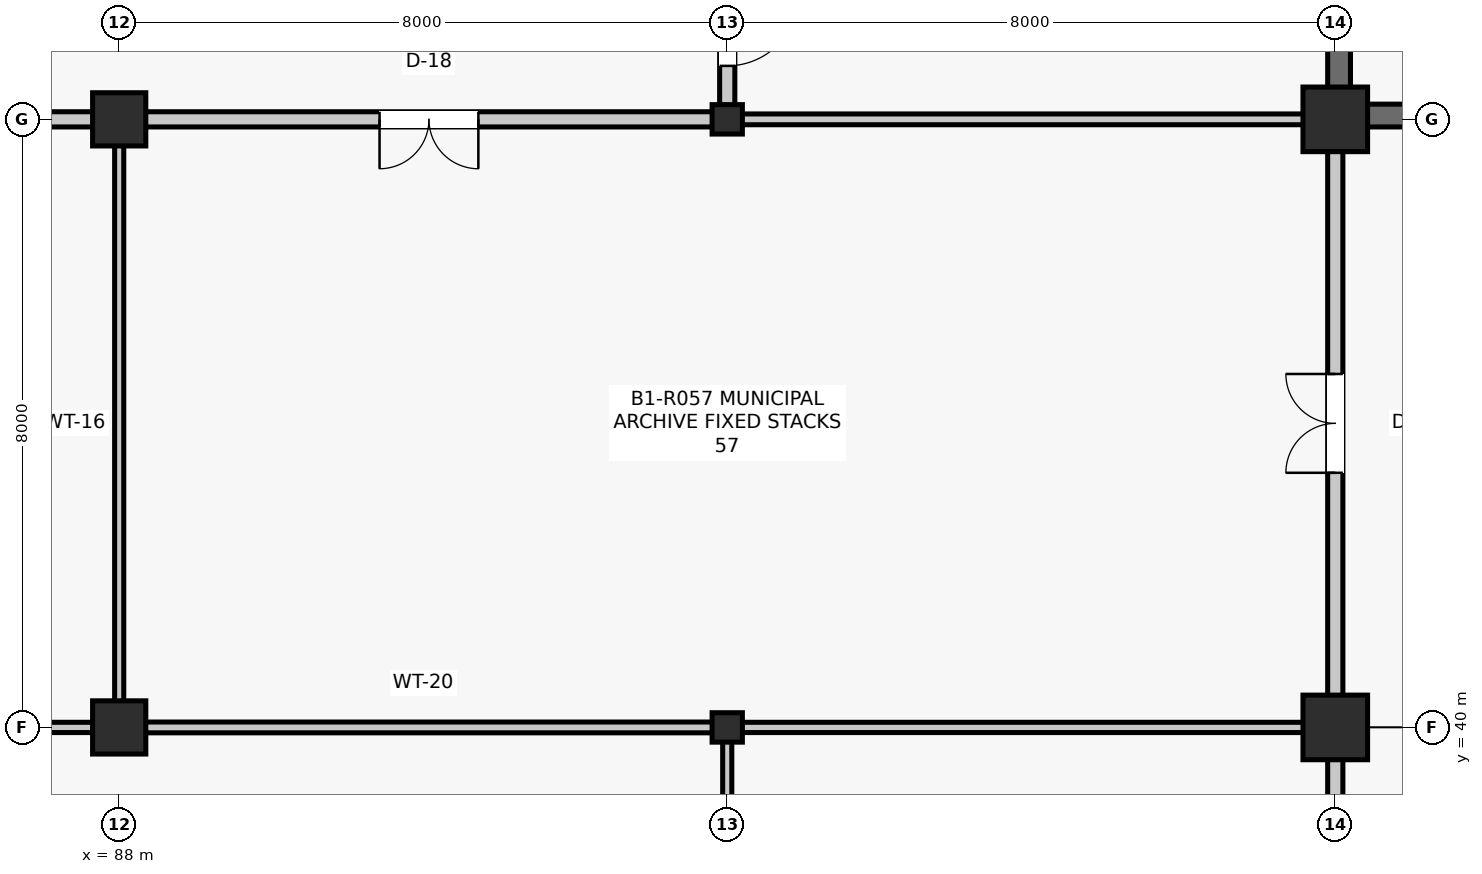
"""IFC4 building model, lengths in metres.
Left out: names, types, materials, properties, quantities, classifications, styles, units other than length and angle.
Written with IfcOpenShell. Run it as: python <this file> out.ifc"""

import sys

from ifc_helpers import new_model, si_unit, direction, frame, frame_2d, origin, origin_2d, place, context, subcontext, project, spatial, rectangle, i_section, extrude, element, fill, save


model = new_model("IFC4")
c1 = context("Model", 3, precision=1e-05, world=origin(), true_north=direction((0.0, 1.0)))
c2 = subcontext(c1, "Body", "Model", "MODEL_VIEW")
j1 = project(units=[si_unit("LENGTHUNIT", "METRE"), si_unit("PLANEANGLEUNIT", "RADIAN")], contexts=[c1])
p1 = place(None, origin())
s1 = spatial("IfcSite", under=j1, at=p1, CompositionType="ELEMENT")
p2 = place(p1, origin())
s2 = spatial("IfcBuilding", under=s1, at=p2, CompositionType="ELEMENT")
p3 = place(p2, frame((0.0, 0.0, -4.29)))
s3 = spatial("IfcBuildingStorey", under=s2, at=p3, CompositionType="ELEMENT", Elevation=-4.29)
for number, where, z_axis, x_axis in (
    (1, (88.0, 40.0, 0.0), (0.0, 0.0, 1.0), (1.0, 0.0, 0.0)),
    (2, (88.0, 48.0, 0.0), (0.0, 0.0, 1.0), (1.0, 0.0, 0.0)),
):
    element("IfcColumn", number, at=place(p3, frame(where, z_axis=z_axis, x_axis=x_axis)), inside=s3, PredefinedType="COLUMN", context=c2, shape_type="SweptSolid", body=[
        extrude(rectangle(XDim=0.7, YDim=0.7, at=origin_2d()), origin(), (0.0, 0.0, 1.0), 4.29),
    ])
for number, where, z_axis, x_axis in (
    (3, (96.0, 40.0, 0.0), (0.0, 0.0, 1.0), (1.0, 0.0, 0.0)),
    (4, (96.0, 48.0, 0.0), (0.0, 0.0, 1.0), (1.0, 0.0, 0.0)),
):
    element("IfcColumn", number, at=place(p3, frame(where, z_axis=z_axis, x_axis=x_axis)), inside=s3, PredefinedType="COLUMN", context=c2, shape_type="SweptSolid", body=[
        extrude(i_section(OverallWidth=0.398, OverallDepth=0.387, WebThickness=0.021, FlangeThickness=0.033, FilletRadius=0.015, at=origin_2d()), origin(), (0.0, 0.0, 1.0), 4.29),
    ])
for number, where, z_axis, x_axis in (
    (5, (104.0, 40.0, 0.0), (0.0, 0.0, 1.0), (1.0, 0.0, 0.0)),
    (6, (104.0, 48.0, 0.0), (0.0, 0.0, 1.0), (1.0, 0.0, 0.0)),
):
    element("IfcColumn", number, at=place(p3, frame(where, z_axis=z_axis, x_axis=x_axis)), inside=s3, PredefinedType="COLUMN", context=c2, shape_type="SweptSolid", body=[
        extrude(rectangle(XDim=0.85, YDim=0.85, at=origin_2d()), origin(), (0.0, 0.0, 1.0), 4.29),
    ])
p4 = place(p3, frame((104.05, 48.315, 0.0), z_axis=(0.0, 0.0, 1.0), x_axis=(0.0, 1.0, 0.0)))
e7 = element("IfcWall", 7, at=p4, inside=s3, PredefinedType="SHEAR", context=c2, shape_type="SweptSolid", body=[
    extrude(rectangle(XDim=7.37, YDim=0.3, at=frame_2d((3.685, 0.0))), origin(), (0.0, 0.0, 1.0), 4.015),
])
p5 = place(p3, frame((104.315, 48.05, 0.0), z_axis=(0.0, 0.0, 1.0), x_axis=(1.0, 0.0, 0.0)))
e8 = element("IfcWall", 8, at=p5, inside=s3, PredefinedType="SHEAR", context=c2, shape_type="SweptSolid", body=[
    extrude(rectangle(XDim=3.835, YDim=0.3, at=frame_2d((1.917, 0.0))), origin(), (0.0, 0.0, 1.0), 4.015),
])
p6 = place(p3, frame((80.189, 40.0, 0.0), z_axis=(0.0, 0.0, 1.0), x_axis=(1.0, 0.0, 0.0)))
e9 = element("IfcWall", 9, at=p6, inside=s3, PredefinedType="PARTITIONING", context=c2, shape_type="SweptSolid", body=[
    extrude(rectangle(XDim=7.471, YDim=0.135, at=frame_2d((3.735, 0.0))), origin(), (0.0, 0.0, 1.0), 3.394),
])
p7 = place(p3, frame((88.0, 40.34, 0.0), z_axis=(0.0, 0.0, 1.0), x_axis=(0.0, 1.0, 0.0)))
e10 = element("IfcWall", 10, at=p7, inside=s3, PredefinedType="PARTITIONING", context=c2, shape_type="SweptSolid", body=[
    extrude(rectangle(XDim=7.32, YDim=0.12, at=frame_2d((3.66, 0.0))), origin(), (0.0, 0.0, 1.0), 3.393),
])
p8 = place(p3, frame((80.189, 48.0, 0.0), z_axis=(0.0, 0.0, 1.0), x_axis=(1.0, 0.0, 0.0)))
e11 = element("IfcWall", 11, at=p8, inside=s3, PredefinedType="PARTITIONING", context=c2, shape_type="SweptSolid", body=[
    extrude(rectangle(XDim=7.471, YDim=0.2, at=frame_2d((3.735, 0.0))), origin(), (0.0, 0.0, 1.0), 3.317),
])
p9 = place(p8, frame((1.368, 0.0, 0.0)))
e12 = element("IfcOpeningElement", 12, at=p9, cuts=e11, PredefinedType="OPENING", context=c2, shape_type="SweptSolid", body=[
    extrude(rectangle(XDim=1.0, YDim=2.15, at=frame_2d((0.5, 1.075))), frame((0.0, 0.11, 0.0), z_axis=(0.0, -1.0, 0.0), x_axis=(1.0, 0.0, 0.0)), (0.0, 0.0, 1.0), 0.22),
])
p10 = place(p8, frame((5.477, 0.0, 0.0)))
e13 = element("IfcOpeningElement", 13, at=p10, cuts=e11, PredefinedType="OPENING", context=c2, shape_type="SweptSolid", body=[
    extrude(rectangle(XDim=1.0, YDim=2.15, at=frame_2d((0.5, 1.075))), frame((0.0, 0.11, 0.0), z_axis=(0.0, -1.0, 0.0), x_axis=(1.0, 0.0, 0.0)), (0.0, 0.0, 1.0), 0.22),
])
p11 = place(p3, frame((96.0, 32.184, 0.0), z_axis=(0.0, 0.0, 1.0), x_axis=(0.0, 1.0, 0.0)))
e14 = element("IfcWall", 14, at=p11, inside=s3, PredefinedType="PARTITIONING", context=c2, shape_type="SweptSolid", body=[
    extrude(rectangle(XDim=7.633, YDim=0.12, at=frame_2d((3.816, 0.0))), origin(), (0.0, 0.0, 1.0), 3.393),
])
p12 = place(p3, frame((88.34, 40.0, 0.0), z_axis=(0.0, 0.0, 1.0), x_axis=(1.0, 0.0, 0.0)))
e15 = element("IfcWall", 15, at=p12, inside=s3, PredefinedType="PARTITIONING", context=c2, shape_type="SweptSolid", body=[
    extrude(rectangle(XDim=7.471, YDim=0.142, at=frame_2d((3.735, 0.0))), origin(), (0.0, 0.0, 1.0), 3.317),
])
p13 = place(p3, frame((88.34, 48.0, 0.0), z_axis=(0.0, 0.0, 1.0), x_axis=(1.0, 0.0, 0.0)))
e16 = element("IfcWall", 16, at=p13, inside=s3, PredefinedType="PARTITIONING", context=c2, shape_type="SweptSolid", body=[
    extrude(rectangle(XDim=7.471, YDim=0.2, at=frame_2d((3.735, 0.0))), origin(), (0.0, 0.0, 1.0), 3.393),
])
p14 = place(p13, frame((3.085, 0.0, 0.0)))
e17 = element("IfcOpeningElement", 17, at=p14, cuts=e16, PredefinedType="OPENING", context=c2, shape_type="SweptSolid", body=[
    extrude(rectangle(XDim=1.3, YDim=2.2, at=frame_2d((0.65, 1.1))), frame((0.0, 0.11, 0.0), z_axis=(0.0, -1.0, 0.0), x_axis=(1.0, 0.0, 0.0)), (0.0, 0.0, 1.0), 0.22),
])
p15 = place(p3, frame((96.0, 48.184, 0.0), z_axis=(0.0, 0.0, 1.0), x_axis=(0.0, 1.0, 0.0)))
e18 = element("IfcWall", 18, at=p15, inside=s3, PredefinedType="PARTITIONING", context=c2, shape_type="SweptSolid", body=[
    extrude(rectangle(XDim=7.633, YDim=0.2, at=frame_2d((3.816, 0.0))), origin(), (0.0, 0.0, 1.0), 3.394),
])
p16 = place(p15, frame((0.52, 0.0, 0.0)))
e19 = element("IfcOpeningElement", 19, at=p16, cuts=e18, PredefinedType="OPENING", context=c2, shape_type="SweptSolid", body=[
    extrude(rectangle(XDim=0.94, YDim=2.12, at=frame_2d((0.47, 1.06))), frame((0.0, 0.11, 0.0), z_axis=(0.0, -1.0, 0.0), x_axis=(1.0, 0.0, 0.0)), (0.0, 0.0, 1.0), 0.22),
])
p17 = place(p3, frame((104.0, 32.415, 0.0), z_axis=(0.0, 0.0, 1.0), x_axis=(0.0, 1.0, 0.0)))
e20 = element("IfcWall", 20, at=p17, inside=s3, PredefinedType="PARTITIONING", context=c2, shape_type="SweptSolid", body=[
    extrude(rectangle(XDim=7.17, YDim=0.2, at=frame_2d((3.585, 0.0))), origin(), (0.0, 0.0, 1.0), 3.402),
])
p18 = place(p17, frame((1.167, 0.0, 0.0)))
e21 = element("IfcOpeningElement", 21, at=p18, cuts=e20, PredefinedType="OPENING", context=c2, shape_type="SweptSolid", body=[
    extrude(rectangle(XDim=1.25, YDim=2.18, at=frame_2d((0.625, 1.09))), frame((0.0, 0.11, 0.0), z_axis=(0.0, -1.0, 0.0), x_axis=(1.0, 0.0, 0.0)), (0.0, 0.0, 1.0), 0.22),
])
p19 = place(p17, frame((5.111, 0.0, 0.0)))
e22 = element("IfcOpeningElement", 22, at=p19, cuts=e20, PredefinedType="OPENING", context=c2, shape_type="SweptSolid", body=[
    extrude(rectangle(XDim=1.25, YDim=2.18, at=frame_2d((0.625, 1.09))), frame((0.0, 0.11, 0.0), z_axis=(0.0, -1.0, 0.0), x_axis=(1.0, 0.0, 0.0)), (0.0, 0.0, 1.0), 0.22),
])
p20 = place(p3, frame((96.189, 40.0, 0.0), z_axis=(0.0, 0.0, 1.0), x_axis=(1.0, 0.0, 0.0)))
e23 = element("IfcWall", 23, at=p20, inside=s3, PredefinedType="PARTITIONING", context=c2, shape_type="SweptSolid", body=[
    extrude(rectangle(XDim=7.396, YDim=0.135, at=frame_2d((3.698, 0.0))), origin(), (0.0, 0.0, 1.0), 3.393),
])
p21 = place(p3, frame((104.0, 40.415, 0.0), z_axis=(0.0, 0.0, 1.0), x_axis=(0.0, 1.0, 0.0)))
e24 = element("IfcWall", 24, at=p21, inside=s3, PredefinedType="PARTITIONING", context=c2, shape_type="SweptSolid", body=[
    extrude(rectangle(XDim=7.17, YDim=0.2, at=frame_2d((3.585, 0.0))), origin(), (0.0, 0.0, 1.0), 3.394),
])
p22 = place(p21, frame((2.935, 0.0, 0.0)))
e25 = element("IfcOpeningElement", 25, at=p22, cuts=e24, PredefinedType="OPENING", context=c2, shape_type="SweptSolid", body=[
    extrude(rectangle(XDim=1.3, YDim=2.2, at=frame_2d((0.65, 1.1))), frame((0.0, 0.11, 0.0), z_axis=(0.0, -1.0, 0.0), x_axis=(1.0, 0.0, 0.0)), (0.0, 0.0, 1.0), 0.22),
])
p23 = place(p3, frame((96.189, 48.0, 0.0), z_axis=(0.0, 0.0, 1.0), x_axis=(1.0, 0.0, 0.0)))
e26 = element("IfcWall", 26, at=p23, inside=s3, PredefinedType="PARTITIONING", context=c2, shape_type="SweptSolid", body=[
    extrude(rectangle(XDim=7.396, YDim=0.142, at=frame_2d((3.698, 0.0))), origin(), (0.0, 0.0, 1.0), 3.326),
])
p24 = place(p14, frame((1.3, 0.0, 0.0), z_axis=(0.0, 0.0, 1.0), x_axis=(-1.0, 0.0, 0.0)))
e27 = element("IfcDoor", 27, at=p24, inside=s3, OperationType="DOUBLE_DOOR_SINGLE_SWING", PredefinedType="DOOR", context=c2, shape_type="SweptSolid", body=[
    extrude(rectangle(XDim=1.3, YDim=2.2, at=frame_2d((0.65, 1.1))), frame((0.0, 0.025, 0.0), z_axis=(0.0, -1.0, 0.0), x_axis=(1.0, 0.0, 0.0)), (0.0, 0.0, 1.0), 0.05),
])
fill(e17, e27)
p25 = place(p16, frame((0.94, 0.0, 0.0), z_axis=(0.0, 0.0, 1.0), x_axis=(-1.0, 0.0, 0.0)))
e28 = element("IfcDoor", 28, at=p25, inside=s3, OperationType="SINGLE_SWING_RIGHT", PredefinedType="DOOR", context=c2, shape_type="SweptSolid", body=[
    extrude(rectangle(XDim=0.94, YDim=2.12, at=frame_2d((0.47, 1.06))), frame((0.0, 0.025, 0.0), z_axis=(0.0, -1.0, 0.0), x_axis=(1.0, 0.0, 0.0)), (0.0, 0.0, 1.0), 0.05),
])
fill(e19, e28)
p26 = place(p22, origin())
e29 = element("IfcDoor", 29, at=p26, inside=s3, OperationType="DOUBLE_DOOR_SINGLE_SWING", PredefinedType="DOOR", context=c2, shape_type="SweptSolid", body=[
    extrude(rectangle(XDim=1.3, YDim=2.2, at=frame_2d((0.65, 1.1))), frame((0.0, 0.025, 0.0), z_axis=(0.0, -1.0, 0.0), x_axis=(1.0, 0.0, 0.0)), (0.0, 0.0, 1.0), 0.05),
])
fill(e25, e29)
save(model, sys.argv[1])
